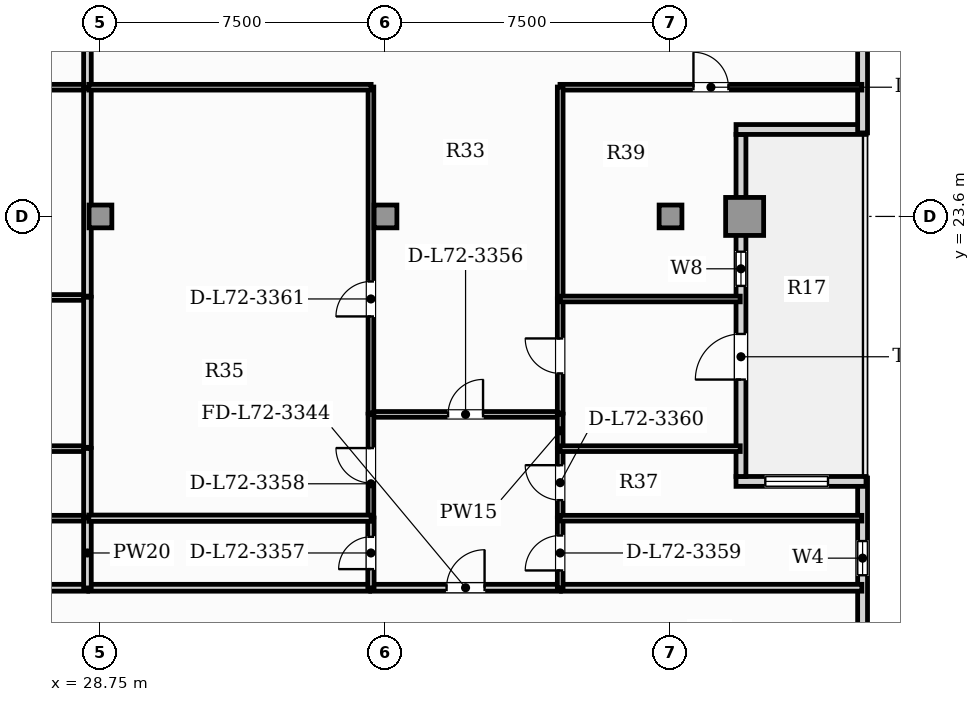
"""IFC4 building model, lengths in metres.
Left out: names, types, materials, properties, quantities, classifications, styles, units other than length and angle.
Written with IfcOpenShell. Run it as: python <this file> out.ifc"""

import sys

from ifc_helpers import new_model, si_unit, direction, frame, frame_2d, origin, origin_2d, place, context, subcontext, project, spatial, rectangle, hollow_rectangle, extrude, element, fill, save


model = new_model("IFC4")
c1 = context("Model", 3, precision=1e-05, world=origin(), true_north=direction((0.0, 1.0)))
c2 = subcontext(c1, "Body", "Model", "MODEL_VIEW")
j1 = project(units=[si_unit("LENGTHUNIT", "METRE"), si_unit("PLANEANGLEUNIT", "RADIAN")], contexts=[c1])
p1 = place(None, origin())
s1 = spatial("IfcSite", under=j1, at=p1, CompositionType="ELEMENT")
p2 = place(p1, origin())
s2 = spatial("IfcBuilding", under=s1, at=p2, CompositionType="ELEMENT")
p3 = place(p2, frame((0.0, 0.0, 292.6)))
s3 = spatial("IfcBuildingStorey", under=s2, at=p3, CompositionType="ELEMENT", Elevation=292.6)
p4 = place(p3, frame((45.7, 23.6, 0.0), z_axis=(0.0, 0.0, 1.0), x_axis=(1.0, 0.0, 0.0)))
e1 = element("IfcColumn", 1, at=p4, inside=s3, PredefinedType="USERDEFINED", context=c2, shape_type="SweptSolid", body=[
    extrude(hollow_rectangle(XDim=1.0, YDim=1.0, WallThickness=0.06, at=origin_2d()), origin(), (0.0, 0.0, 1.0), 3.85),
])
for number, where, z_axis, x_axis in (
    (2, (28.75, 23.6, 0.0), (0.0, 0.0, 1.0), (1.0, 0.0, 0.0)),
    (3, (36.25, 23.6, 0.0), (0.0, 0.0, 1.0), (1.0, 0.0, 0.0)),
    (4, (43.75, 23.6, 0.0), (0.0, 0.0, 1.0), (1.0, 0.0, 0.0)),
):
    element("IfcColumn", number, at=place(p3, frame(where, z_axis=z_axis, x_axis=x_axis)), inside=s3, PredefinedType="COLUMN", context=c2, shape_type="SweptSolid", body=[
        extrude(rectangle(XDim=0.6, YDim=0.6, at=origin_2d()), origin(), (0.0, 0.0, 1.0), 3.85),
    ])
p5 = place(p3, frame((48.804, 3.24, 0.0), z_axis=(0.0, 0.0, 1.0), x_axis=(0.0, 1.0, 0.0)))
e5 = element("IfcWall", 5, at=p5, inside=s3, PredefinedType="SOLIDWALL", context=c2, shape_type="SweptSolid", body=[
    extrude(rectangle(XDim=13.478, YDim=0.26, at=frame_2d((6.739, 0.0))), origin(), (0.0, 0.0, 1.0), 3.65),
])
p6 = place(p5, frame((10.919, 0.0, 0.95)))
e6 = element("IfcOpeningElement", 6, at=p6, cuts=e5, PredefinedType="OPENING", context=c2, shape_type="SweptSolid", body=[
    extrude(rectangle(XDim=0.9, YDim=1.5, at=frame_2d((0.45, 0.75))), frame((0.0, 0.14, 0.0), z_axis=(0.0, -1.0, 0.0), x_axis=(1.0, 0.0, 0.0)), (0.0, 0.0, 1.0), 0.28),
])
p7 = place(p3, frame((48.894, 16.628, 0.0), z_axis=(0.0, 0.0, 1.0), x_axis=(-1.0, 0.0, 0.0)))
e7 = element("IfcWall", 7, at=p7, inside=s3, PredefinedType="SOLIDWALL", context=c2, shape_type="SweptSolid", body=[
    extrude(rectangle(XDim=3.42, YDim=0.26, at=frame_2d((1.71, 0.0))), origin(), (0.0, 0.0, 1.0), 3.65),
])
p8 = place(p7, frame((1.0, 0.0, 0.88)))
e8 = element("IfcOpeningElement", 8, at=p8, cuts=e7, PredefinedType="OPENING", context=c2, shape_type="SweptSolid", body=[
    extrude(rectangle(XDim=1.65, YDim=2.0, at=frame_2d((0.825, 1.0))), frame((0.0, 0.14, 0.0), z_axis=(0.0, -1.0, 0.0), x_axis=(1.0, 0.0, 0.0)), (0.0, 0.0, 1.0), 0.28),
])
p9 = place(p3, frame((45.604, 16.758, 0.0), z_axis=(0.0, 0.0, 1.0), x_axis=(0.0, 1.0, 0.0)))
e9 = element("IfcWall", 9, at=p9, inside=s3, PredefinedType="SOLIDWALL", context=c2, shape_type="SweptSolid", body=[
    extrude(rectangle(XDim=9.0, YDim=0.26, at=frame_2d((4.5, 0.0))), origin(), (0.0, 0.0, 1.0), 3.19),
])
p10 = place(p9, frame((2.55, 0.0, 0.0)))
e10 = element("IfcOpeningElement", 10, at=p10, cuts=e9, PredefinedType="OPENING", context=c2, shape_type="SweptSolid", body=[
    extrude(rectangle(XDim=1.2, YDim=2.2, at=frame_2d((0.6, 1.1))), frame((0.0, 0.14, 0.0), z_axis=(0.0, -1.0, 0.0), x_axis=(1.0, 0.0, 0.0)), (0.0, 0.0, 1.0), 0.28),
])
p11 = place(p9, frame((5.014, 0.0, 0.85)))
e11 = element("IfcOpeningElement", 11, at=p11, cuts=e9, PredefinedType="OPENING", context=c2, shape_type="SweptSolid", body=[
    extrude(rectangle(XDim=0.9, YDim=1.4, at=frame_2d((0.45, 0.7))), frame((0.0, 0.14, 0.0), z_axis=(0.0, -1.0, 0.0), x_axis=(1.0, 0.0, 0.0)), (0.0, 0.0, 1.0), 0.28),
])
p12 = place(p3, frame((45.474, 25.888, 0.0), z_axis=(0.0, 0.0, 1.0), x_axis=(1.0, 0.0, 0.0)))
e12 = element("IfcWall", 12, at=p12, inside=s3, PredefinedType="SOLIDWALL", context=c2, shape_type="SweptSolid", body=[
    extrude(rectangle(XDim=3.42, YDim=0.26, at=frame_2d((1.71, 0.0))), origin(), (0.0, 0.0, 1.0), 3.65),
])
p13 = place(p3, frame((48.804, 25.798, 0.0), z_axis=(0.0, 0.0, 1.0), x_axis=(0.0, 1.0, 0.0)))
e13 = element("IfcWall", 13, at=p13, inside=s3, PredefinedType="SOLIDWALL", context=c2, shape_type="SweptSolid", body=[
    extrude(rectangle(XDim=5.078, YDim=0.26, at=frame_2d((2.539, 0.0))), origin(), (0.0, 0.0, 1.0), 3.65),
])
p14 = place(p13, frame((3.398, 0.0, 0.95)))
e14 = element("IfcOpeningElement", 14, at=p14, cuts=e13, PredefinedType="OPENING", context=c2, shape_type="SweptSolid", body=[
    extrude(rectangle(XDim=0.9, YDim=1.5, at=frame_2d((0.45, 0.75))), frame((0.0, 0.14, 0.0), z_axis=(0.0, -1.0, 0.0), x_axis=(1.0, 0.0, 0.0)), (0.0, 0.0, 1.0), 0.28),
])
p15 = place(p3, frame((21.368, 13.83, 0.0), z_axis=(0.0, 0.0, 1.0), x_axis=(1.0, 0.0, 0.0)))
e15 = element("IfcWall", 15, at=p15, inside=s3, PredefinedType="PARTITIONING", context=c2, shape_type="SweptSolid", body=[
    extrude(rectangle(XDim=7.045, YDim=0.18, at=frame_2d((3.522, 0.0))), origin(), (0.0, 0.0, 1.0), 3.65),
])
p16 = place(p3, frame((35.862, 13.83, 0.0), z_axis=(0.0, 0.0, 1.0), x_axis=(1.0, 0.0, 0.0)))
e16 = element("IfcWall", 16, at=p16, inside=s3, PredefinedType="PARTITIONING", context=c2, shape_type="SweptSolid", body=[
    extrude(rectangle(XDim=4.99, YDim=0.18, at=frame_2d((2.495, 0.0))), origin(), (0.0, 0.0, 1.0), 3.65),
])
p17 = place(p16, frame((1.995, 0.0, 0.0)))
e17 = element("IfcOpeningElement", 17, at=p17, cuts=e16, PredefinedType="OPENING", context=c2, shape_type="SweptSolid", body=[
    extrude(rectangle(XDim=1.0, YDim=2.15, at=frame_2d((0.5, 1.075))), frame((0.0, 0.1, 0.0), z_axis=(0.0, -1.0, 0.0), x_axis=(1.0, 0.0, 0.0)), (0.0, 0.0, 1.0), 0.2),
])
p18 = place(p3, frame((28.443, 13.83, 0.0), z_axis=(0.0, 0.0, 1.0), x_axis=(1.0, 0.0, 0.0)))
e18 = element("IfcWall", 18, at=p18, inside=s3, PredefinedType="PARTITIONING", context=c2, shape_type="SweptSolid", body=[
    extrude(rectangle(XDim=7.389, YDim=0.18, at=frame_2d((3.695, 0.0))), origin(), (0.0, 0.0, 1.0), 3.65),
])
p19 = place(p3, frame((40.882, 13.83, 0.0), z_axis=(0.0, 0.0, 1.0), x_axis=(1.0, 0.0, 0.0)))
e19 = element("IfcWall", 19, at=p19, inside=s3, PredefinedType="PARTITIONING", context=c2, shape_type="SweptSolid", body=[
    extrude(rectangle(XDim=7.902, YDim=0.18, at=frame_2d((3.951, 0.0))), origin(), (0.0, 0.0, 1.0), 3.65),
])
p20 = place(p3, frame((21.328, 27.0, 0.0), z_axis=(0.0, 0.0, 1.0), x_axis=(1.0, 0.0, 0.0)))
e20 = element("IfcWall", 20, at=p20, inside=s3, PredefinedType="PARTITIONING", context=c2, shape_type="SweptSolid", body=[
    extrude(rectangle(XDim=7.085, YDim=0.15, at=frame_2d((3.542, 0.0))), origin(), (0.0, 0.0, 1.0), 3.65),
])
p21 = place(p20, frame((3.083, 0.0, 0.0)))
e21 = element("IfcOpeningElement", 21, at=p21, cuts=e20, PredefinedType="OPENING", context=c2, shape_type="SweptSolid", body=[
    extrude(rectangle(XDim=0.92, YDim=2.1, at=frame_2d((0.46, 1.05))), frame((0.0, 0.085, 0.0), z_axis=(0.0, -1.0, 0.0), x_axis=(1.0, 0.0, 0.0)), (0.0, 0.0, 1.0), 0.17),
])
p22 = place(p3, frame((28.408, 26.995, 0.0), z_axis=(0.0, 0.0, 1.0), x_axis=(0.0, 1.0, 0.0)))
e22 = element("IfcWall", 22, at=p22, inside=s3, PredefinedType="PARTITIONING", context=c2, shape_type="SweptSolid", body=[
    extrude(rectangle(XDim=1.51, YDim=0.2, at=frame_2d((0.755, 0.0))), origin(), (0.0, 0.0, 1.0), 3.65),
])
p23 = place(p3, frame((21.328, 15.66, 0.0), z_axis=(0.0, 0.0, 1.0), x_axis=(1.0, 0.0, 0.0)))
e23 = element("IfcWall", 23, at=p23, inside=s3, PredefinedType="PARTITIONING", context=c2, shape_type="SweptSolid", body=[
    extrude(rectangle(XDim=7.085, YDim=0.15, at=frame_2d((3.542, 0.0))), origin(), (0.0, 0.0, 1.0), 3.65),
])
p24 = place(p3, frame((28.408, 13.825, 0.0), z_axis=(0.0, 0.0, 1.0), x_axis=(0.0, 1.0, 0.0)))
e24 = element("IfcWall", 24, at=p24, inside=s3, PredefinedType="PARTITIONING", context=c2, shape_type="SweptSolid", body=[
    extrude(rectangle(XDim=1.84, YDim=0.2, at=frame_2d((0.92, 0.0))), origin(), (0.0, 0.0, 1.0), 3.65),
])
p25 = place(p3, frame((21.328, 17.49, 0.0), z_axis=(0.0, 0.0, 1.0), x_axis=(1.0, 0.0, 0.0)))
e25 = element("IfcWall", 25, at=p25, inside=s3, PredefinedType="PARTITIONING", context=c2, shape_type="SweptSolid", body=[
    extrude(rectangle(XDim=7.085, YDim=0.15, at=frame_2d((3.542, 0.0))), origin(), (0.0, 0.0, 1.0), 3.65),
])
p26 = place(p3, frame((28.408, 15.695, 0.0), z_axis=(0.0, 0.0, 1.0), x_axis=(0.0, 1.0, 0.0)))
e26 = element("IfcWall", 26, at=p26, inside=s3, PredefinedType="PARTITIONING", context=c2, shape_type="SweptSolid", body=[
    extrude(rectangle(XDim=1.8, YDim=0.2, at=frame_2d((0.9, 0.0))), origin(), (0.0, 0.0, 1.0), 3.65),
])
p27 = place(p3, frame((21.328, 21.469, 0.0), z_axis=(0.0, 0.0, 1.0), x_axis=(1.0, 0.0, 0.0)))
e27 = element("IfcWall", 27, at=p27, inside=s3, PredefinedType="PARTITIONING", context=c2, shape_type="SweptSolid", body=[
    extrude(rectangle(XDim=7.085, YDim=0.15, at=frame_2d((3.542, 0.0))), origin(), (0.0, 0.0, 1.0), 3.65),
])
p28 = place(p3, frame((28.408, 17.525, 0.0), z_axis=(0.0, 0.0, 1.0), x_axis=(0.0, 1.0, 0.0)))
e28 = element("IfcWall", 28, at=p28, inside=s3, PredefinedType="PARTITIONING", context=c2, shape_type="SweptSolid", body=[
    extrude(rectangle(XDim=3.948, YDim=0.2, at=frame_2d((1.974, 0.0))), origin(), (0.0, 0.0, 1.0), 3.65),
])
p29 = place(p3, frame((28.408, 21.503, 0.0), z_axis=(0.0, 0.0, 1.0), x_axis=(0.0, 1.0, 0.0)))
e29 = element("IfcWall", 29, at=p29, inside=s3, PredefinedType="PARTITIONING", context=c2, shape_type="SweptSolid", body=[
    extrude(rectangle(XDim=5.462, YDim=0.2, at=frame_2d((2.731, 0.0))), origin(), (0.0, 0.0, 1.0), 3.65),
])
p30 = place(p3, frame((35.862, 18.391, 0.0), z_axis=(0.0, 0.0, 1.0), x_axis=(1.0, 0.0, 0.0)))
e30 = element("IfcWall", 30, at=p30, inside=s3, PredefinedType="PARTITIONING", context=c2, shape_type="SweptSolid", body=[
    extrude(rectangle(XDim=4.99, YDim=0.15, at=frame_2d((2.495, 0.0))), origin(), (0.0, 0.0, 1.0), 3.65),
])
p31 = place(p30, frame((2.035, 0.0, 0.0)))
e31 = element("IfcOpeningElement", 31, at=p31, cuts=e30, PredefinedType="OPENING", context=c2, shape_type="SweptSolid", body=[
    extrude(rectangle(XDim=0.92, YDim=2.1, at=frame_2d((0.46, 1.05))), frame((0.0, 0.085, 0.0), z_axis=(0.0, -1.0, 0.0), x_axis=(1.0, 0.0, 0.0)), (0.0, 0.0, 1.0), 0.17),
])
p32 = place(p3, frame((35.867, 13.825, 0.0), z_axis=(0.0, 0.0, 1.0), x_axis=(0.0, 1.0, 0.0)))
e32 = element("IfcWall", 32, at=p32, inside=s3, PredefinedType="PLUMBINGWALL", context=c2, shape_type="SweptSolid", body=[
    extrude(rectangle(XDim=1.84, YDim=0.165, at=frame_2d((0.92, 0.0))), origin(), (0.0, 0.0, 1.0), 3.65),
])
p33 = place(p32, frame((0.495, 0.0, 0.0)))
e33 = element("IfcOpeningElement", 33, at=p33, cuts=e32, PredefinedType="OPENING", context=c2, shape_type="SweptSolid", body=[
    extrude(rectangle(XDim=0.85, YDim=2.1, at=frame_2d((0.425, 1.05))), frame((0.0, 0.093, 0.0), z_axis=(0.0, -1.0, 0.0), x_axis=(1.0, 0.0, 0.0)), (0.0, 0.0, 1.0), 0.185),
])
p34 = place(p3, frame((35.867, 15.695, 0.0), z_axis=(0.0, 0.0, 1.0), x_axis=(0.0, 1.0, 0.0)))
e34 = element("IfcWall", 34, at=p34, inside=s3, PredefinedType="PARTITIONING", context=c2, shape_type="SweptSolid", body=[
    extrude(rectangle(XDim=2.701, YDim=0.15, at=frame_2d((1.351, 0.0))), origin(), (0.0, 0.0, 1.0), 3.65),
])
p35 = place(p34, frame((0.891, 0.0, 0.0)))
e35 = element("IfcOpeningElement", 35, at=p35, cuts=e34, PredefinedType="OPENING", context=c2, shape_type="SweptSolid", body=[
    extrude(rectangle(XDim=0.92, YDim=2.1, at=frame_2d((0.46, 1.05))), frame((0.0, 0.085, 0.0), z_axis=(0.0, -1.0, 0.0), x_axis=(1.0, 0.0, 0.0)), (0.0, 0.0, 1.0), 0.17),
])
p36 = place(p3, frame((40.847, 13.825, 0.0), z_axis=(0.0, 0.0, 1.0), x_axis=(0.0, 1.0, 0.0)))
e36 = element("IfcWall", 36, at=p36, inside=s3, PredefinedType="PARTITIONING", context=c2, shape_type="SweptSolid", body=[
    extrude(rectangle(XDim=1.84, YDim=0.15, at=frame_2d((0.92, 0.0))), origin(), (0.0, 0.0, 1.0), 3.65),
])
p37 = place(p36, frame((0.46, 0.0, 0.0)))
e37 = element("IfcOpeningElement", 37, at=p37, cuts=e36, PredefinedType="OPENING", context=c2, shape_type="SweptSolid", body=[
    extrude(rectangle(XDim=0.92, YDim=2.1, at=frame_2d((0.46, 1.05))), frame((0.0, 0.085, 0.0), z_axis=(0.0, -1.0, 0.0), x_axis=(1.0, 0.0, 0.0)), (0.0, 0.0, 1.0), 0.17),
])
p38 = place(p3, frame((40.847, 15.695, 0.0), z_axis=(0.0, 0.0, 1.0), x_axis=(0.0, 1.0, 0.0)))
e38 = element("IfcWall", 38, at=p38, inside=s3, PredefinedType="PARTITIONING", context=c2, shape_type="SweptSolid", body=[
    extrude(rectangle(XDim=1.8, YDim=0.15, at=frame_2d((0.9, 0.0))), origin(), (0.0, 0.0, 1.0), 3.65),
])
p39 = place(p38, frame((0.44, 0.0, 0.0)))
e39 = element("IfcOpeningElement", 39, at=p39, cuts=e38, PredefinedType="OPENING", context=c2, shape_type="SweptSolid", body=[
    extrude(rectangle(XDim=0.92, YDim=2.1, at=frame_2d((0.46, 1.05))), frame((0.0, 0.085, 0.0), z_axis=(0.0, -1.0, 0.0), x_axis=(1.0, 0.0, 0.0)), (0.0, 0.0, 1.0), 0.17),
])
p40 = place(p3, frame((40.847, 17.525, 0.0), z_axis=(0.0, 0.0, 1.0), x_axis=(0.0, 1.0, 0.0)))
e40 = element("IfcWall", 40, at=p40, inside=s3, PredefinedType="PARTITIONING", context=c2, shape_type="SweptSolid", body=[
    extrude(rectangle(XDim=0.871, YDim=0.15, at=frame_2d((0.436, 0.0))), origin(), (0.0, 0.0, 1.0), 3.65),
])
p41 = place(p3, frame((35.867, 18.426, 0.0), z_axis=(0.0, 0.0, 1.0), x_axis=(0.0, 1.0, 0.0)))
e41 = element("IfcWall", 41, at=p41, inside=s3, PredefinedType="PARTITIONING", context=c2, shape_type="SweptSolid", body=[
    extrude(rectangle(XDim=8.579, YDim=0.15, at=frame_2d((4.289, 0.0))), origin(), (0.0, 0.0, 1.0), 3.65),
])
p42 = place(p41, frame((2.542, 0.0, 0.0)))
e42 = element("IfcOpeningElement", 42, at=p42, cuts=e41, PredefinedType="OPENING", context=c2, shape_type="SweptSolid", body=[
    extrude(rectangle(XDim=0.92, YDim=2.1, at=frame_2d((0.46, 1.05))), frame((0.0, 0.085, 0.0), z_axis=(0.0, -1.0, 0.0), x_axis=(1.0, 0.0, 0.0)), (0.0, 0.0, 1.0), 0.17),
])
p43 = place(p3, frame((28.443, 27.0, 0.0), z_axis=(0.0, 0.0, 1.0), x_axis=(1.0, 0.0, 0.0)))
e43 = element("IfcWall", 43, at=p43, inside=s3, PredefinedType="PARTITIONING", context=c2, shape_type="SweptSolid", body=[
    extrude(rectangle(XDim=7.429, YDim=0.15, at=frame_2d((3.715, 0.0))), origin(), (0.0, 0.0, 1.0), 3.65),
])
p44 = place(p3, frame((40.847, 18.426, 0.0), z_axis=(0.0, 0.0, 1.0), x_axis=(0.0, 1.0, 0.0)))
e44 = element("IfcWall", 44, at=p44, inside=s3, PredefinedType="PARTITIONING", context=c2, shape_type="SweptSolid", body=[
    extrude(rectangle(XDim=3.007, YDim=0.15, at=frame_2d((1.503, 0.0))), origin(), (0.0, 0.0, 1.0), 3.65),
])
p45 = place(p44, frame((1.043, 0.0, 0.0)))
e45 = element("IfcOpeningElement", 45, at=p45, cuts=e44, PredefinedType="OPENING", context=c2, shape_type="SweptSolid", body=[
    extrude(rectangle(XDim=0.92, YDim=2.1, at=frame_2d((0.46, 1.05))), frame((0.0, 0.085, 0.0), z_axis=(0.0, -1.0, 0.0), x_axis=(1.0, 0.0, 0.0)), (0.0, 0.0, 1.0), 0.17),
])
p46 = place(p3, frame((40.842, 27.0, 0.0), z_axis=(0.0, 0.0, 1.0), x_axis=(1.0, 0.0, 0.0)))
e46 = element("IfcWall", 46, at=p46, inside=s3, PredefinedType="PARTITIONING", context=c2, shape_type="SweptSolid", body=[
    extrude(rectangle(XDim=7.942, YDim=0.15, at=frame_2d((3.971, 0.0))), origin(), (0.0, 0.0, 1.0), 3.65),
])
p47 = place(p46, frame((3.511, 0.0, 0.0)))
e47 = element("IfcOpeningElement", 47, at=p47, cuts=e46, PredefinedType="OPENING", context=c2, shape_type="SweptSolid", body=[
    extrude(rectangle(XDim=0.92, YDim=2.1, at=frame_2d((0.46, 1.05))), frame((0.0, 0.085, 0.0), z_axis=(0.0, -1.0, 0.0), x_axis=(1.0, 0.0, 0.0)), (0.0, 0.0, 1.0), 0.17),
])
p48 = place(p3, frame((40.847, 21.463, 0.0), z_axis=(0.0, 0.0, 1.0), x_axis=(0.0, 1.0, 0.0)))
e48 = element("IfcWall", 48, at=p48, inside=s3, PredefinedType="PARTITIONING", context=c2, shape_type="SweptSolid", body=[
    extrude(rectangle(XDim=5.542, YDim=0.15, at=frame_2d((2.771, 0.0))), origin(), (0.0, 0.0, 1.0), 3.65),
])
p49 = place(p3, frame((28.443, 15.66, 0.0), z_axis=(0.0, 0.0, 1.0), x_axis=(1.0, 0.0, 0.0)))
e49 = element("IfcWall", 49, at=p49, inside=s3, PredefinedType="PLUMBINGWALL", context=c2, shape_type="SweptSolid", body=[
    extrude(rectangle(XDim=7.429, YDim=0.165, at=frame_2d((3.715, 0.0))), origin(), (0.0, 0.0, 1.0), 3.65),
])
p50 = place(p3, frame((40.842, 15.66, 0.0), z_axis=(0.0, 0.0, 1.0), x_axis=(1.0, 0.0, 0.0)))
e50 = element("IfcWall", 50, at=p50, inside=s3, PredefinedType="PARTITIONING", context=c2, shape_type="SweptSolid", body=[
    extrude(rectangle(XDim=7.942, YDim=0.15, at=frame_2d((3.971, 0.0))), origin(), (0.0, 0.0, 1.0), 3.65),
])
for number, where, z_axis, x_axis in (
    (51, (40.842, 17.49, 0.0), (0.0, 0.0, 1.0), (1.0, 0.0, 0.0)),
    (52, (40.842, 21.428, 0.0), (0.0, 0.0, 1.0), (1.0, 0.0, 0.0)),
):
    element("IfcWall", number, at=place(p3, frame(where, z_axis=z_axis, x_axis=x_axis)), inside=s3, PredefinedType="PARTITIONING", context=c2, shape_type="SweptSolid", body=[
        extrude(rectangle(XDim=4.742, YDim=0.15, at=frame_2d((2.371, 0.0))), origin(), (0.0, 0.0, 1.0), 3.65),
    ])
p51 = place(p10, frame((1.2, 0.0, 0.0), z_axis=(0.0, 0.0, 1.0), x_axis=(-1.0, 0.0, 0.0)))
e53 = element("IfcDoor", 53, at=p51, inside=s3, OperationType="SINGLE_SWING_RIGHT", PredefinedType="DOOR", context=c2, shape_type="SweptSolid", body=[
    extrude(rectangle(XDim=1.2, YDim=2.2, at=frame_2d((0.6, 1.1))), frame((0.0, 0.025, 0.0), z_axis=(0.0, -1.0, 0.0), x_axis=(1.0, 0.0, 0.0)), (0.0, 0.0, 1.0), 0.05),
])
fill(e10, e53)
p52 = place(p6, origin())
e54 = element("IfcWindow", 54, at=p52, inside=s3, PartitioningType="SINGLE_PANEL", PredefinedType="WINDOW", context=c2, shape_type="SweptSolid", body=[
    extrude(rectangle(XDim=0.9, YDim=1.5, at=frame_2d((0.45, 0.75))), frame((0.0, 0.03, 0.0), z_axis=(0.0, -1.0, 0.0), x_axis=(1.0, 0.0, 0.0)), (0.0, 0.0, 1.0), 0.06),
])
fill(e6, e54)
p53 = place(p8, origin())
e55 = element("IfcWindow", 55, at=p53, inside=s3, PartitioningType="SINGLE_PANEL", PredefinedType="WINDOW", context=c2, shape_type="SweptSolid", body=[
    extrude(rectangle(XDim=1.65, YDim=2.0, at=frame_2d((0.825, 1.0))), frame((0.0, 0.03, 0.0), z_axis=(0.0, -1.0, 0.0), x_axis=(1.0, 0.0, 0.0)), (0.0, 0.0, 1.0), 0.06),
])
fill(e8, e55)
p54 = place(p11, origin())
e56 = element("IfcWindow", 56, at=p54, inside=s3, PartitioningType="SINGLE_PANEL", PredefinedType="WINDOW", context=c2, shape_type="SweptSolid", body=[
    extrude(rectangle(XDim=0.9, YDim=1.4, at=frame_2d((0.45, 0.7))), frame((0.0, 0.03, 0.0), z_axis=(0.0, -1.0, 0.0), x_axis=(1.0, 0.0, 0.0)), (0.0, 0.0, 1.0), 0.06),
])
fill(e11, e56)
p55 = place(p17, origin())
e57 = element("IfcDoor", 57, at=p55, inside=s3, OperationType="SINGLE_SWING_RIGHT", PredefinedType="DOOR", context=c2, shape_type="SweptSolid", body=[
    extrude(rectangle(XDim=1.0, YDim=2.15, at=frame_2d((0.5, 1.075))), frame((0.0, 0.025, 0.0), z_axis=(0.0, -1.0, 0.0), x_axis=(1.0, 0.0, 0.0)), (0.0, 0.0, 1.0), 0.05),
])
fill(e17, e57)
p56 = place(p31, origin())
e58 = element("IfcDoor", 58, at=p56, inside=s3, OperationType="SINGLE_SWING_RIGHT", PredefinedType="DOOR", context=c2, shape_type="SweptSolid", body=[
    extrude(rectangle(XDim=0.92, YDim=2.1, at=frame_2d((0.46, 1.05))), frame((0.0, 0.025, 0.0), z_axis=(0.0, -1.0, 0.0), x_axis=(1.0, 0.0, 0.0)), (0.0, 0.0, 1.0), 0.05),
])
fill(e31, e58)
p57 = place(p33, origin())
e59 = element("IfcDoor", 59, at=p57, inside=s3, OperationType="SINGLE_SWING_LEFT", PredefinedType="DOOR", context=c2, shape_type="SweptSolid", body=[
    extrude(rectangle(XDim=0.85, YDim=2.1, at=frame_2d((0.425, 1.05))), frame((0.0, 0.025, 0.0), z_axis=(0.0, -1.0, 0.0), x_axis=(1.0, 0.0, 0.0)), (0.0, 0.0, 1.0), 0.05),
])
fill(e33, e59)
p58 = place(p35, origin())
e60 = element("IfcDoor", 60, at=p58, inside=s3, OperationType="SINGLE_SWING_RIGHT", PredefinedType="DOOR", context=c2, shape_type="SweptSolid", body=[
    extrude(rectangle(XDim=0.92, YDim=2.1, at=frame_2d((0.46, 1.05))), frame((0.0, 0.025, 0.0), z_axis=(0.0, -1.0, 0.0), x_axis=(1.0, 0.0, 0.0)), (0.0, 0.0, 1.0), 0.05),
])
fill(e35, e60)
p59 = place(p37, origin())
e61 = element("IfcDoor", 61, at=p59, inside=s3, OperationType="SINGLE_SWING_LEFT", PredefinedType="DOOR", context=c2, shape_type="SweptSolid", body=[
    extrude(rectangle(XDim=0.92, YDim=2.1, at=frame_2d((0.46, 1.05))), frame((0.0, 0.025, 0.0), z_axis=(0.0, -1.0, 0.0), x_axis=(1.0, 0.0, 0.0)), (0.0, 0.0, 1.0), 0.05),
])
fill(e37, e61)
p60 = place(p39, origin())
e62 = element("IfcDoor", 62, at=p60, inside=s3, OperationType="SINGLE_SWING_RIGHT", PredefinedType="DOOR", context=c2, shape_type="SweptSolid", body=[
    extrude(rectangle(XDim=0.92, YDim=2.1, at=frame_2d((0.46, 1.05))), frame((0.0, 0.025, 0.0), z_axis=(0.0, -1.0, 0.0), x_axis=(1.0, 0.0, 0.0)), (0.0, 0.0, 1.0), 0.05),
])
fill(e39, e62)
p61 = place(p42, origin())
e63 = element("IfcDoor", 63, at=p61, inside=s3, OperationType="SINGLE_SWING_LEFT", PredefinedType="DOOR", context=c2, shape_type="SweptSolid", body=[
    extrude(rectangle(XDim=0.92, YDim=2.1, at=frame_2d((0.46, 1.05))), frame((0.0, 0.025, 0.0), z_axis=(0.0, -1.0, 0.0), x_axis=(1.0, 0.0, 0.0)), (0.0, 0.0, 1.0), 0.05),
])
fill(e42, e63)
p62 = place(p45, origin())
e64 = element("IfcDoor", 64, at=p62, inside=s3, OperationType="SINGLE_SWING_RIGHT", PredefinedType="DOOR", context=c2, shape_type="SweptSolid", body=[
    extrude(rectangle(XDim=0.92, YDim=2.1, at=frame_2d((0.46, 1.05))), frame((0.0, 0.025, 0.0), z_axis=(0.0, -1.0, 0.0), x_axis=(1.0, 0.0, 0.0)), (0.0, 0.0, 1.0), 0.05),
])
fill(e45, e64)
p63 = place(p47, origin())
e65 = element("IfcDoor", 65, at=p63, inside=s3, OperationType="SINGLE_SWING_LEFT", PredefinedType="DOOR", context=c2, shape_type="SweptSolid", body=[
    extrude(rectangle(XDim=0.92, YDim=2.1, at=frame_2d((0.46, 1.05))), frame((0.0, 0.025, 0.0), z_axis=(0.0, -1.0, 0.0), x_axis=(1.0, 0.0, 0.0)), (0.0, 0.0, 1.0), 0.05),
])
fill(e47, e65)
save(model, sys.argv[1])
